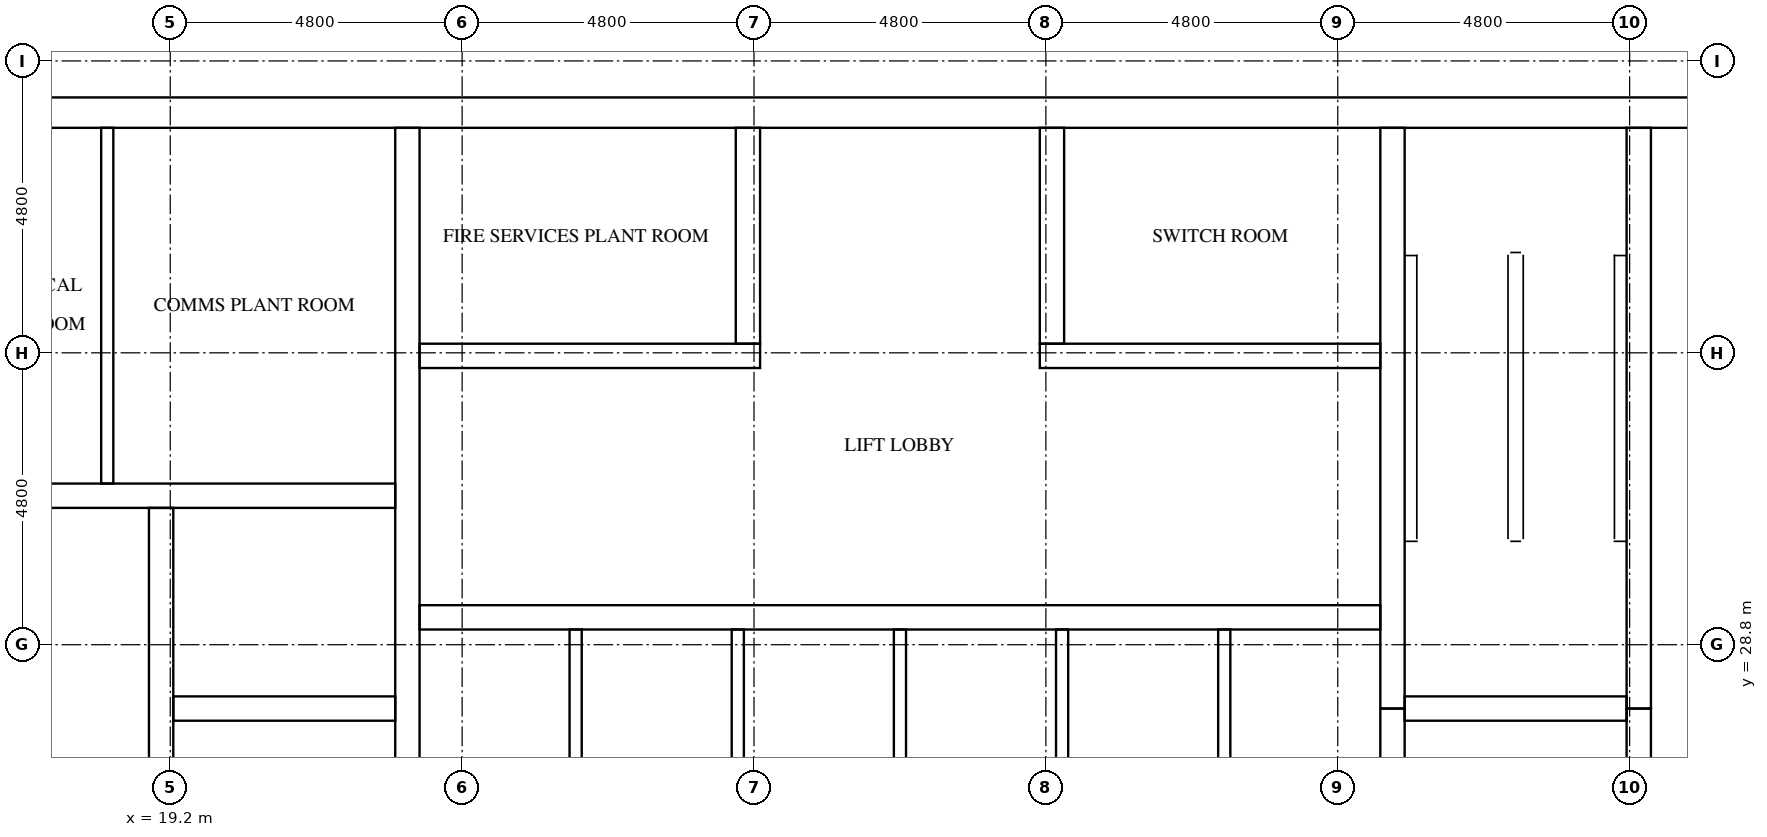
"""IFC4 building model, lengths in metres.
Left out: names, types, materials, properties, quantities, classifications, styles, units other than length and angle.
Written with IfcOpenShell. Run it as: python <this file> out.ifc"""

import sys

from ifc_helpers import new_model, si_unit, direction, frame, frame_2d, origin, place, context, subcontext, project, spatial, rectangle, extrude, element, fill, save


model = new_model("IFC4")
c1 = context("Model", 3, precision=1e-05, world=origin(), true_north=direction((0.0, 1.0)))
c2 = subcontext(c1, "Body", "Model", "MODEL_VIEW")
j1 = project(units=[si_unit("LENGTHUNIT", "METRE"), si_unit("PLANEANGLEUNIT", "RADIAN")], contexts=[c1])
p1 = place(None, origin())
s1 = spatial("IfcSite", under=j1, at=p1, CompositionType="ELEMENT")
p2 = place(p1, origin())
s2 = spatial("IfcBuilding", under=s1, at=p2, CompositionType="ELEMENT")
p3 = place(p2, frame((0.0, 0.0, 286.1)))
s3 = spatial("IfcBuildingStorey", under=s2, at=p3, CompositionType="ELEMENT", Elevation=286.1)
p4 = place(p3, frame((15.0, 37.55, 0.0), z_axis=(0.0, 0.0, 1.0), x_axis=(1.0, 0.0, 0.0)))
e1 = element("IfcWall", 1, at=p4, inside=s3, PredefinedType="SHEAR", context=c2, shape_type="SweptSolid", body=[
    extrude(rectangle(XDim=32.4, YDim=0.5, at=frame_2d((16.2, 0.0))), origin(), (0.0, 0.0, 1.0), 5.1),
])
p5 = place(p4, frame((15.3, 0.0, 0.0)))
e2 = element("IfcOpeningElement", 2, at=p5, cuts=e1, PredefinedType="OPENING", context=c2, shape_type="SweptSolid", body=[
    extrude(rectangle(XDim=1.8, YDim=2.1, at=frame_2d((0.9, 1.05))), frame((0.0, 0.26, 0.0), z_axis=(0.0, -1.0, 0.0), x_axis=(1.0, 0.0, 0.0)), (0.0, 0.0, 1.0), 0.52),
])
p6 = place(p4, frame((1.282, 0.0, 0.0)))
e3 = element("IfcOpeningElement", 3, at=p6, cuts=e1, PredefinedType="OPENING", context=c2, shape_type="SweptSolid", body=[
    extrude(rectangle(XDim=1.0, YDim=2.1, at=frame_2d((0.5, 1.05))), frame((0.0, 0.26, 0.0), z_axis=(0.0, -1.0, 0.0), x_axis=(1.0, 0.0, 0.0)), (0.0, 0.0, 1.0), 0.52),
])
p7 = place(p4, frame((5.082, 0.0, 0.0)))
e4 = element("IfcOpeningElement", 4, at=p7, cuts=e1, PredefinedType="OPENING", context=c2, shape_type="SweptSolid", body=[
    extrude(rectangle(XDim=1.0, YDim=2.1, at=frame_2d((0.5, 1.05))), frame((0.0, 0.26, 0.0), z_axis=(0.0, -1.0, 0.0), x_axis=(1.0, 0.0, 0.0)), (0.0, 0.0, 1.0), 0.52),
])
p8 = place(p3, frame((19.05, 15.5, 0.0), z_axis=(0.0, 0.0, 1.0), x_axis=(0.0, 1.0, 0.0)))
e5 = element("IfcWall", 5, at=p8, inside=s3, PredefinedType="SHEAR", context=c2, shape_type="SweptSolid", body=[
    extrude(rectangle(XDim=15.55, YDim=0.4, at=frame_2d((7.775, 0.0))), origin(), (0.0, 0.0, 1.0), 5.1),
])
p9 = place(p8, frame((9.95, 0.0, 0.0)))
e6 = element("IfcOpeningElement", 6, at=p9, cuts=e5, PredefinedType="OPENING", context=c2, shape_type="SweptSolid", body=[
    extrude(rectangle(XDim=1.1, YDim=2.1, at=frame_2d((0.55, 1.05))), frame((0.0, 0.21, 0.0), z_axis=(0.0, -1.0, 0.0), x_axis=(1.0, 0.0, 0.0)), (0.0, 0.0, 1.0), 0.42),
])
p10 = place(p8, frame((13.45, 0.0, 0.0)))
e7 = element("IfcOpeningElement", 7, at=p10, cuts=e5, PredefinedType="OPENING", context=c2, shape_type="SweptSolid", body=[
    extrude(rectangle(XDim=1.1, YDim=2.1, at=frame_2d((0.55, 1.05))), frame((0.0, 0.21, 0.0), z_axis=(0.0, -1.0, 0.0), x_axis=(1.0, 0.0, 0.0)), (0.0, 0.0, 1.0), 0.42),
])
p11 = place(p8, frame((0.7, 0.0, 0.0)))
e8 = element("IfcOpeningElement", 8, at=p11, cuts=e5, PredefinedType="OPENING", context=c2, shape_type="SweptSolid", body=[
    extrude(rectangle(XDim=1.2, YDim=2.1, at=frame_2d((0.6, 1.05))), frame((0.0, 0.21, 0.0), z_axis=(0.0, -1.0, 0.0), x_axis=(1.0, 0.0, 0.0)), (0.0, 0.0, 1.0), 0.42),
])
p12 = place(p3, frame((23.1, 15.5, 0.0), z_axis=(0.0, 0.0, 1.0), x_axis=(0.0, 1.0, 0.0)))
e9 = element("IfcWall", 9, at=p12, inside=s3, PredefinedType="SHEAR", context=c2, shape_type="SweptSolid", body=[
    extrude(rectangle(XDim=21.8, YDim=0.4, at=frame_2d((10.9, 0.0))), origin(), (0.0, 0.0, 1.0), 5.1),
])
p13 = place(p3, frame((39.3, 24.25, 0.0), z_axis=(0.0, 0.0, 1.0), x_axis=(0.0, 1.0, 0.0)))
e10 = element("IfcWall", 10, at=p13, inside=s3, PredefinedType="SHEAR", context=c2, shape_type="SweptSolid", body=[
    extrude(rectangle(XDim=3.5, YDim=0.4, at=frame_2d((1.75, 0.0))), origin(), (0.0, 0.0, 1.0), 5.1),
])
p14 = place(p3, frame((39.3, 27.75, 0.0), z_axis=(0.0, 0.0, 1.0), x_axis=(0.0, 1.0, 0.0)))
e11 = element("IfcWall", 11, at=p14, inside=s3, PredefinedType="SHEAR", context=c2, shape_type="SweptSolid", body=[
    extrude(rectangle(XDim=9.55, YDim=0.4, at=frame_2d((4.775, 0.0))), origin(), (0.0, 0.0, 1.0), 5.1),
])
p15 = place(p3, frame((43.35, 24.25, 0.0), z_axis=(0.0, 0.0, 1.0), x_axis=(0.0, 1.0, 0.0)))
e12 = element("IfcWall", 12, at=p15, inside=s3, PredefinedType="SHEAR", context=c2, shape_type="SweptSolid", body=[
    extrude(rectangle(XDim=3.5, YDim=0.4, at=frame_2d((1.75, 0.0))), origin(), (0.0, 0.0, 1.0), 5.1),
])
p16 = place(p15, frame((1.2, 0.0, 0.0)))
e13 = element("IfcOpeningElement", 13, at=p16, cuts=e12, PredefinedType="OPENING", context=c2, shape_type="SweptSolid", body=[
    extrude(rectangle(XDim=1.1, YDim=2.1, at=frame_2d((0.55, 1.05))), frame((0.0, 0.21, 0.0), z_axis=(0.0, -1.0, 0.0), x_axis=(1.0, 0.0, 0.0)), (0.0, 0.0, 1.0), 0.42),
])
p17 = place(p3, frame((43.35, 27.75, 0.0), z_axis=(0.0, 0.0, 1.0), x_axis=(0.0, 1.0, 0.0)))
e14 = element("IfcWall", 14, at=p17, inside=s3, PredefinedType="SHEAR", context=c2, shape_type="SweptSolid", body=[
    extrude(rectangle(XDim=9.55, YDim=0.4, at=frame_2d((4.775, 0.0))), origin(), (0.0, 0.0, 1.0), 5.1),
])
p18 = place(p17, frame((7.65, 0.0, 0.0)))
e15 = element("IfcOpeningElement", 15, at=p18, cuts=e14, PredefinedType="OPENING", context=c2, shape_type="SweptSolid", body=[
    extrude(rectangle(XDim=1.2, YDim=2.1, at=frame_2d((0.6, 1.05))), frame((0.0, 0.21, 0.0), z_axis=(0.0, -1.0, 0.0), x_axis=(1.0, 0.0, 0.0)), (0.0, 0.0, 1.0), 0.42),
])
p19 = place(p3, frame((19.25, 27.75, 0.0), z_axis=(0.0, 0.0, 1.0), x_axis=(1.0, 0.0, 0.0)))
e16 = element("IfcWall", 16, at=p19, inside=s3, PredefinedType="SHEAR", context=c2, shape_type="SweptSolid", body=[
    extrude(rectangle(XDim=3.65, YDim=0.4, at=frame_2d((1.825, 0.0))), origin(), (0.0, 0.0, 1.0), 5.1),
])
p20 = place(p3, frame((15.5, 31.25, 0.0), z_axis=(0.0, 0.0, 1.0), x_axis=(1.0, 0.0, 0.0)))
e17 = element("IfcWall", 17, at=p20, inside=s3, PredefinedType="SHEAR", context=c2, shape_type="SweptSolid", body=[
    extrude(rectangle(XDim=7.4, YDim=0.4, at=frame_2d((3.7, 0.0))), origin(), (0.0, 0.0, 1.0), 5.1),
])
p21 = place(p3, frame((39.5, 27.75, 0.0), z_axis=(0.0, 0.0, 1.0), x_axis=(1.0, 0.0, 0.0)))
e18 = element("IfcWall", 18, at=p21, inside=s3, PredefinedType="SHEAR", context=c2, shape_type="SweptSolid", body=[
    extrude(rectangle(XDim=3.65, YDim=0.4, at=frame_2d((1.825, 0.0))), origin(), (0.0, 0.0, 1.0), 5.1),
])
p22 = place(p3, frame((23.3, 29.25, 0.0), z_axis=(0.0, 0.0, 1.0), x_axis=(1.0, 0.0, 0.0)))
e19 = element("IfcWall", 19, at=p22, inside=s3, PredefinedType="SHEAR", context=c2, shape_type="SweptSolid", body=[
    extrude(rectangle(XDim=15.8, YDim=0.4, at=frame_2d((7.9, 0.0))), origin(), (0.0, 0.0, 1.0), 5.1),
])
p23 = place(p22, frame((0.683, 0.0, 0.0)))
e20 = element("IfcOpeningElement", 20, at=p23, cuts=e19, PredefinedType="OPENING", context=c2, shape_type="SweptSolid", body=[
    extrude(rectangle(XDim=1.1, YDim=2.1, at=frame_2d((0.55, 1.05))), frame((0.0, 0.21, 0.0), z_axis=(0.0, -1.0, 0.0), x_axis=(1.0, 0.0, 0.0)), (0.0, 0.0, 1.0), 0.42),
])
p24 = place(p22, frame((3.35, 0.0, 0.0)))
e21 = element("IfcOpeningElement", 21, at=p24, cuts=e19, PredefinedType="OPENING", context=c2, shape_type="SweptSolid", body=[
    extrude(rectangle(XDim=1.1, YDim=2.1, at=frame_2d((0.55, 1.05))), frame((0.0, 0.21, 0.0), z_axis=(0.0, -1.0, 0.0), x_axis=(1.0, 0.0, 0.0)), (0.0, 0.0, 1.0), 0.42),
])
p25 = place(p22, frame((6.017, 0.0, 0.0)))
e22 = element("IfcOpeningElement", 22, at=p25, cuts=e19, PredefinedType="OPENING", context=c2, shape_type="SweptSolid", body=[
    extrude(rectangle(XDim=1.1, YDim=2.1, at=frame_2d((0.55, 1.05))), frame((0.0, 0.21, 0.0), z_axis=(0.0, -1.0, 0.0), x_axis=(1.0, 0.0, 0.0)), (0.0, 0.0, 1.0), 0.42),
])
p26 = place(p22, frame((8.683, 0.0, 0.0)))
e23 = element("IfcOpeningElement", 23, at=p26, cuts=e19, PredefinedType="OPENING", context=c2, shape_type="SweptSolid", body=[
    extrude(rectangle(XDim=1.1, YDim=2.1, at=frame_2d((0.55, 1.05))), frame((0.0, 0.21, 0.0), z_axis=(0.0, -1.0, 0.0), x_axis=(1.0, 0.0, 0.0)), (0.0, 0.0, 1.0), 0.42),
])
p27 = place(p22, frame((11.35, 0.0, 0.0)))
e24 = element("IfcOpeningElement", 24, at=p27, cuts=e19, PredefinedType="OPENING", context=c2, shape_type="SweptSolid", body=[
    extrude(rectangle(XDim=1.1, YDim=2.1, at=frame_2d((0.55, 1.05))), frame((0.0, 0.21, 0.0), z_axis=(0.0, -1.0, 0.0), x_axis=(1.0, 0.0, 0.0)), (0.0, 0.0, 1.0), 0.42),
])
p28 = place(p22, frame((14.017, 0.0, 0.0)))
e25 = element("IfcOpeningElement", 25, at=p28, cuts=e19, PredefinedType="OPENING", context=c2, shape_type="SweptSolid", body=[
    extrude(rectangle(XDim=1.1, YDim=2.1, at=frame_2d((0.55, 1.05))), frame((0.0, 0.21, 0.0), z_axis=(0.0, -1.0, 0.0), x_axis=(1.0, 0.0, 0.0)), (0.0, 0.0, 1.0), 0.42),
])
p29 = place(p3, frame((23.3, 33.55, 0.0), z_axis=(0.0, 0.0, 1.0), x_axis=(1.0, 0.0, 0.0)))
e26 = element("IfcWall", 26, at=p29, inside=s3, PredefinedType="SHEAR", context=c2, shape_type="SweptSolid", body=[
    extrude(rectangle(XDim=5.6, YDim=0.4, at=frame_2d((2.8, 0.0))), origin(), (0.0, 0.0, 1.0), 5.1),
])
p30 = place(p29, frame((2.1, 0.0, 0.0)))
e27 = element("IfcOpeningElement", 27, at=p30, cuts=e26, PredefinedType="OPENING", context=c2, shape_type="SweptSolid", body=[
    extrude(rectangle(XDim=1.0, YDim=2.1, at=frame_2d((0.5, 1.05))), frame((0.0, 0.21, 0.0), z_axis=(0.0, -1.0, 0.0), x_axis=(1.0, 0.0, 0.0)), (0.0, 0.0, 1.0), 0.42),
])
p31 = place(p3, frame((33.5, 33.55, 0.0), z_axis=(0.0, 0.0, 1.0), x_axis=(1.0, 0.0, 0.0)))
e28 = element("IfcWall", 28, at=p31, inside=s3, PredefinedType="SHEAR", context=c2, shape_type="SweptSolid", body=[
    extrude(rectangle(XDim=5.6, YDim=0.4, at=frame_2d((2.8, 0.0))), origin(), (0.0, 0.0, 1.0), 5.1),
])
p32 = place(p31, frame((2.5, 0.0, 0.0)))
e29 = element("IfcOpeningElement", 29, at=p32, cuts=e28, PredefinedType="OPENING", context=c2, shape_type="SweptSolid", body=[
    extrude(rectangle(XDim=1.0, YDim=2.1, at=frame_2d((0.5, 1.05))), frame((0.0, 0.21, 0.0), z_axis=(0.0, -1.0, 0.0), x_axis=(1.0, 0.0, 0.0)), (0.0, 0.0, 1.0), 0.42),
])
for number, where, z_axis, x_axis in (
    (30, (28.7, 33.75, 0.0), (0.0, 0.0, 1.0), (0.0, 1.0, 0.0)),
    (31, (33.7, 33.75, 0.0), (0.0, 0.0, 1.0), (0.0, 1.0, 0.0)),
):
    element("IfcWall", number, at=place(p3, frame(where, z_axis=z_axis, x_axis=x_axis)), inside=s3, PredefinedType="SHEAR", context=c2, shape_type="SweptSolid", body=[
        extrude(rectangle(XDim=3.55, YDim=0.4, at=frame_2d((1.775, 0.0))), origin(), (0.0, 0.0, 1.0), 5.1),
    ])
for number, where, z_axis, x_axis in (
    (32, (25.867, 26.35, 0.0), (0.0, 0.0, 1.0), (0.0, 1.0, 0.0)),
    (33, (28.533, 26.35, 0.0), (0.0, 0.0, 1.0), (0.0, 1.0, 0.0)),
    (34, (31.2, 26.35, 0.0), (0.0, 0.0, 1.0), (0.0, 1.0, 0.0)),
    (35, (33.867, 26.35, 0.0), (0.0, 0.0, 1.0), (0.0, 1.0, 0.0)),
    (36, (36.533, 26.35, 0.0), (0.0, 0.0, 1.0), (0.0, 1.0, 0.0)),
):
    element("IfcWall", number, at=place(p3, frame(where, z_axis=z_axis, x_axis=x_axis)), inside=s3, PredefinedType="SOLIDWALL", context=c2, shape_type="SweptSolid", body=[
        extrude(rectangle(XDim=2.7, YDim=0.2, at=frame_2d((1.35, 0.0))), origin(), (0.0, 0.0, 1.0), 5.1),
    ])
p33 = place(p3, frame((18.164, 31.45, 0.0), z_axis=(0.0, 0.0, 1.0), x_axis=(0.0, 1.0, 0.0)))
e37 = element("IfcWall", 37, at=p33, inside=s3, PredefinedType="PARTITIONING", context=c2, shape_type="SweptSolid", body=[
    extrude(rectangle(XDim=5.85, YDim=0.2, at=frame_2d((2.925, 0.0))), origin(), (0.0, 0.0, 1.0), 5.1),
])
p34 = place(p23, origin())
e38 = element("IfcDoor", 38, at=p34, inside=s3, OperationType="DOUBLE_DOOR_SLIDING", PredefinedType="DOOR", context=c2, shape_type="SweptSolid", body=[
    extrude(rectangle(XDim=1.1, YDim=2.1, at=frame_2d((0.55, 1.05))), frame((0.0, 0.025, 0.0), z_axis=(0.0, -1.0, 0.0), x_axis=(1.0, 0.0, 0.0)), (0.0, 0.0, 1.0), 0.05),
])
fill(e20, e38)
p35 = place(p24, origin())
e39 = element("IfcDoor", 39, at=p35, inside=s3, OperationType="DOUBLE_DOOR_SLIDING", PredefinedType="DOOR", context=c2, shape_type="SweptSolid", body=[
    extrude(rectangle(XDim=1.1, YDim=2.1, at=frame_2d((0.55, 1.05))), frame((0.0, 0.025, 0.0), z_axis=(0.0, -1.0, 0.0), x_axis=(1.0, 0.0, 0.0)), (0.0, 0.0, 1.0), 0.05),
])
fill(e21, e39)
p36 = place(p25, origin())
e40 = element("IfcDoor", 40, at=p36, inside=s3, OperationType="DOUBLE_DOOR_SLIDING", PredefinedType="DOOR", context=c2, shape_type="SweptSolid", body=[
    extrude(rectangle(XDim=1.1, YDim=2.1, at=frame_2d((0.55, 1.05))), frame((0.0, 0.025, 0.0), z_axis=(0.0, -1.0, 0.0), x_axis=(1.0, 0.0, 0.0)), (0.0, 0.0, 1.0), 0.05),
])
fill(e22, e40)
p37 = place(p26, origin())
e41 = element("IfcDoor", 41, at=p37, inside=s3, OperationType="DOUBLE_DOOR_SLIDING", PredefinedType="DOOR", context=c2, shape_type="SweptSolid", body=[
    extrude(rectangle(XDim=1.1, YDim=2.1, at=frame_2d((0.55, 1.05))), frame((0.0, 0.025, 0.0), z_axis=(0.0, -1.0, 0.0), x_axis=(1.0, 0.0, 0.0)), (0.0, 0.0, 1.0), 0.05),
])
fill(e23, e41)
p38 = place(p27, origin())
e42 = element("IfcDoor", 42, at=p38, inside=s3, OperationType="DOUBLE_DOOR_SLIDING", PredefinedType="DOOR", context=c2, shape_type="SweptSolid", body=[
    extrude(rectangle(XDim=1.1, YDim=2.1, at=frame_2d((0.55, 1.05))), frame((0.0, 0.025, 0.0), z_axis=(0.0, -1.0, 0.0), x_axis=(1.0, 0.0, 0.0)), (0.0, 0.0, 1.0), 0.05),
])
fill(e24, e42)
p39 = place(p28, origin())
e43 = element("IfcDoor", 43, at=p39, inside=s3, OperationType="DOUBLE_DOOR_SLIDING", PredefinedType="DOOR", context=c2, shape_type="SweptSolid", body=[
    extrude(rectangle(XDim=1.1, YDim=2.1, at=frame_2d((0.55, 1.05))), frame((0.0, 0.025, 0.0), z_axis=(0.0, -1.0, 0.0), x_axis=(1.0, 0.0, 0.0)), (0.0, 0.0, 1.0), 0.05),
])
fill(e25, e43)
p40 = place(p10, origin())
e44 = element("IfcDoor", 44, at=p40, inside=s3, OperationType="DOUBLE_DOOR_SLIDING", PredefinedType="DOOR", context=c2, shape_type="SweptSolid", body=[
    extrude(rectangle(XDim=1.1, YDim=2.1, at=frame_2d((0.55, 1.05))), frame((0.0, 0.025, 0.0), z_axis=(0.0, -1.0, 0.0), x_axis=(1.0, 0.0, 0.0)), (0.0, 0.0, 1.0), 0.05),
])
fill(e7, e44)
p41 = place(p18, origin())
e45 = element("IfcDoor", 45, at=p41, inside=s3, OperationType="SINGLE_SWING_LEFT", PredefinedType="DOOR", context=c2, shape_type="SweptSolid", body=[
    extrude(rectangle(XDim=1.2, YDim=2.1, at=frame_2d((0.6, 1.05))), frame((0.0, 0.025, 0.0), z_axis=(0.0, -1.0, 0.0), x_axis=(1.0, 0.0, 0.0)), (0.0, 0.0, 1.0), 0.05),
])
fill(e15, e45)
p42 = place(p5, origin())
e46 = element("IfcDoor", 46, at=p42, inside=s3, OperationType="DOUBLE_DOOR_SINGLE_SWING", PredefinedType="DOOR", context=c2, shape_type="SweptSolid", body=[
    extrude(rectangle(XDim=1.8, YDim=2.1, at=frame_2d((0.9, 1.05))), frame((0.0, 0.025, 0.0), z_axis=(0.0, -1.0, 0.0), x_axis=(1.0, 0.0, 0.0)), (0.0, 0.0, 1.0), 0.05),
])
fill(e2, e46)
p43 = place(p6, origin())
e47 = element("IfcDoor", 47, at=p43, inside=s3, OperationType="SINGLE_SWING_RIGHT", PredefinedType="DOOR", context=c2, shape_type="SweptSolid", body=[
    extrude(rectangle(XDim=1.0, YDim=2.1, at=frame_2d((0.5, 1.05))), frame((0.0, 0.025, 0.0), z_axis=(0.0, -1.0, 0.0), x_axis=(1.0, 0.0, 0.0)), (0.0, 0.0, 1.0), 0.05),
])
fill(e3, e47)
p44 = place(p7, origin())
e48 = element("IfcDoor", 48, at=p44, inside=s3, OperationType="SINGLE_SWING_LEFT", PredefinedType="DOOR", context=c2, shape_type="SweptSolid", body=[
    extrude(rectangle(XDim=1.0, YDim=2.1, at=frame_2d((0.5, 1.05))), frame((0.0, 0.025, 0.0), z_axis=(0.0, -1.0, 0.0), x_axis=(1.0, 0.0, 0.0)), (0.0, 0.0, 1.0), 0.05),
])
fill(e4, e48)
p45 = place(p30, frame((1.0, 0.0, 0.0), z_axis=(0.0, 0.0, 1.0), x_axis=(-1.0, 0.0, 0.0)))
e49 = element("IfcDoor", 49, at=p45, inside=s3, OperationType="SINGLE_SWING_RIGHT", PredefinedType="DOOR", context=c2, shape_type="SweptSolid", body=[
    extrude(rectangle(XDim=1.0, YDim=2.1, at=frame_2d((0.5, 1.05))), frame((0.0, 0.025, 0.0), z_axis=(0.0, -1.0, 0.0), x_axis=(1.0, 0.0, 0.0)), (0.0, 0.0, 1.0), 0.05),
])
fill(e27, e49)
p46 = place(p32, frame((1.0, 0.0, 0.0), z_axis=(0.0, 0.0, 1.0), x_axis=(-1.0, 0.0, 0.0)))
e50 = element("IfcDoor", 50, at=p46, inside=s3, OperationType="SINGLE_SWING_LEFT", PredefinedType="DOOR", context=c2, shape_type="SweptSolid", body=[
    extrude(rectangle(XDim=1.0, YDim=2.1, at=frame_2d((0.5, 1.05))), frame((0.0, 0.025, 0.0), z_axis=(0.0, -1.0, 0.0), x_axis=(1.0, 0.0, 0.0)), (0.0, 0.0, 1.0), 0.05),
])
fill(e29, e50)
save(model, sys.argv[1])
